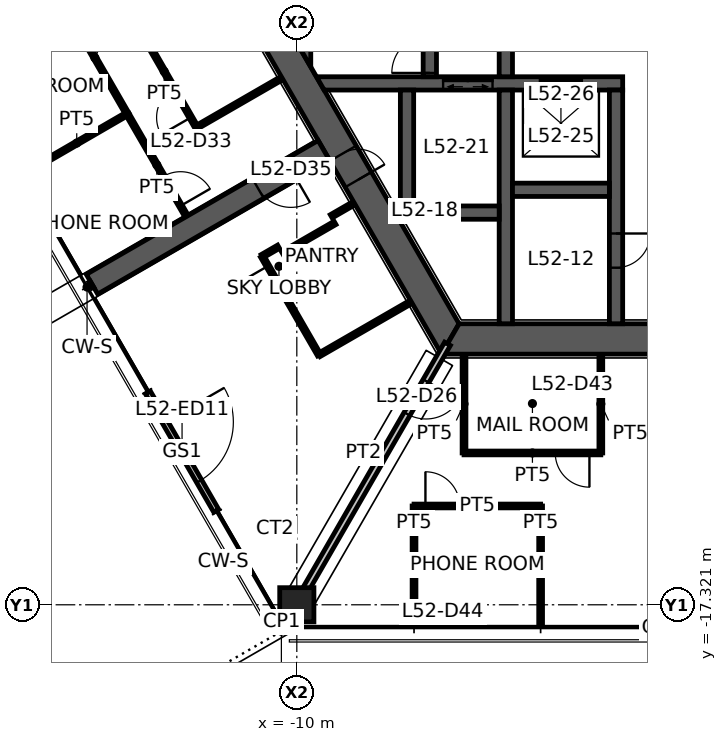
"""IFC4 building model, lengths in metres.
Left out: names, types, materials, properties, quantities, classifications, styles, units other than length and angle.
Written with IfcOpenShell. Run it as: python <this file> out.ifc"""

import sys

from ifc_helpers import new_model, si_unit, direction, frame, frame_2d, origin, origin_2d, place, context, subcontext, project, spatial, polyline, rectangle, hollow_rectangle, outline, extrude, element, fill, save


model = new_model("IFC4")
c1 = context("Model", 3, precision=1e-05, world=origin(), true_north=direction((0.0, 1.0)))
c2 = subcontext(c1, "Body", "Model", "MODEL_VIEW")
j1 = project(units=[si_unit("LENGTHUNIT", "METRE"), si_unit("PLANEANGLEUNIT", "RADIAN")], contexts=[c1])
p1 = place(None, origin())
s1 = spatial("IfcSite", under=j1, at=p1, CompositionType="ELEMENT")
p2 = place(p1, origin())
s2 = spatial("IfcBuilding", under=s1, at=p2, CompositionType="ELEMENT")
p3 = place(p2, frame((0.0, 0.0, 208.3)))
s3 = spatial("IfcBuildingStorey", under=s2, at=p3, CompositionType="ELEMENT", Elevation=208.3)
p4 = place(p3, frame((-10.0, -17.321, 0.0), z_axis=(0.0, 0.0, 1.0), x_axis=(1.0, 0.0, 0.0)))
e1 = element("IfcColumn", 1, at=p4, inside=s3, PredefinedType="COLUMN", context=c2, shape_type="SweptSolid", body=[
    extrude(hollow_rectangle(XDim=0.9, YDim=0.9, WallThickness=0.09, at=origin_2d()), origin(), (0.0, 0.0, 1.0), 4.5),
])
p5 = place(p3, frame((-11.922, 0.0, 0.0), z_axis=(0.0, 0.0, 1.0), x_axis=(0.500004296715, -0.866022923061, 0.0)))
e2 = element("IfcWall", 2, at=p5, inside=s3, PredefinedType="SHEAR", context=c2, shape_type="SweptSolid", body=[
    extrude(outline(polyline([(-0.231, -0.4), (6.281, -0.4), (7.081, -0.4), (12.153, -0.4), (11.691, 0.4), (7.081, 0.4), (6.281, 0.4), (0.231, 0.4), (-0.231, -0.4)])), origin(), (0.0, 0.0, 1.0), 4.5),
])
p6 = place(p5, frame((6.281, 0.0, 0.0)))
e3 = element("IfcOpeningElement", 3, at=p6, cuts=e2, PredefinedType="OPENING", context=c2, shape_type="SweptSolid", body=[
    extrude(rectangle(XDim=0.8, YDim=2.1, at=frame_2d((0.4, 1.05))), frame((0.0, 0.41, 0.0), z_axis=(0.0, -1.0, 0.0), x_axis=(1.0, 0.0, 0.0)), (0.0, 0.0, 1.0), 0.82),
])
p7 = place(p3, frame((-5.961, -10.325, 0.0), z_axis=(0.0, 0.0, 1.0), x_axis=(1.0, 0.0, 0.0)))
e4 = element("IfcWall", 4, at=p7, inside=s3, PredefinedType="SHEAR", context=c2, shape_type="SweptSolid", body=[
    extrude(outline(polyline([(-0.231, -0.4), (5.461, -0.4), (6.461, -0.4), (12.153, -0.4), (11.691, 0.4), (6.461, 0.4), (5.461, 0.4), (0.231, 0.4), (-0.231, -0.4)])), origin(), (0.0, 0.0, 1.0), 4.5),
])
p8 = place(p7, frame((5.461, 0.0, 0.0)))
e5 = element("IfcOpeningElement", 5, at=p8, cuts=e4, PredefinedType="OPENING", context=c2, shape_type="SweptSolid", body=[
    extrude(rectangle(XDim=1.0, YDim=2.1, at=frame_2d((0.5, 1.05))), frame((0.0, 0.41, 0.0), z_axis=(0.0, -1.0, 0.0), x_axis=(1.0, 0.0, 0.0)), (0.0, 0.0, 1.0), 0.82),
])
p9 = place(p3, frame((-9.288, -5.363, 0.0), z_axis=(0.0, 0.0, 1.0), x_axis=(-0.866027473358, -0.499996415376, 0.0)))
e6 = element("IfcWall", 6, at=p9, inside=s3, PredefinedType="SHEAR", context=c2, shape_type="SweptSolid", body=[
    extrude(rectangle(XDim=7.045, YDim=0.6, at=frame_2d((3.523, 0.0))), origin(), (0.0, 0.0, 1.0), 4.5),
])
p10 = place(p9, frame((1.0, 0.0, 0.0)))
e7 = element("IfcOpeningElement", 7, at=p10, cuts=e6, PredefinedType="OPENING", context=c2, shape_type="SweptSolid", body=[
    extrude(rectangle(XDim=1.0, YDim=2.1, at=frame_2d((0.5, 1.05))), frame((0.0, 0.31, 0.0), z_axis=(0.0, -1.0, 0.0), x_axis=(1.0, 0.0, 0.0)), (0.0, 0.0, 1.0), 0.62),
])
p11 = place(p3, frame((-13.92, -11.731, 0.0), z_axis=(0.0, 0.0, 1.0), x_axis=(0.500012057535, -0.866018442252, 0.0)))
e8 = element("IfcWall", 8, at=p11, inside=s3, PredefinedType="STANDARD", context=c2, shape_type="SweptSolid", body=[
    extrude(rectangle(XDim=3.6, YDim=0.15, at=frame_2d((1.8, 0.0))), origin(), (0.0, 0.0, 1.0), 4.5),
])
p12 = place(p11, frame((0.9, 0.0, 0.0)))
e9 = element("IfcOpeningElement", 9, at=p12, cuts=e8, PredefinedType="OPENING", context=c2, shape_type="SweptSolid", body=[
    extrude(rectangle(XDim=1.8, YDim=2.1, at=frame_2d((0.9, 1.05))), frame((0.0, 0.085, 0.0), z_axis=(0.0, -1.0, 0.0), x_axis=(1.0, 0.0, 0.0)), (0.0, 0.0, 1.0), 0.17),
])
p13 = place(p3, frame((-9.382, -3.6, 0.0), z_axis=(0.0, 0.0, 1.0), x_axis=(1.0, 0.0, 0.0)))
e10 = element("IfcWall", 10, at=p13, inside=s3, PredefinedType="SHEAR", context=c2, shape_type="SweptSolid", body=[
    extrude(outline(polyline([(0.101, -0.175), (3.232, -0.175), (4.532, -0.175), (5.782, -0.175), (6.882, -0.175), (7.957, -0.175), (7.957, 0.175), (6.882, 0.175), (5.782, 0.175), (4.532, 0.175), (3.232, 0.175), (-0.101, 0.175), (0.101, -0.175)])), origin(), (0.0, 0.0, 1.0), 4.5),
])
p14 = place(p13, frame((5.782, 0.0, 0.0)))
e11 = element("IfcOpeningElement", 11, at=p14, cuts=e10, PredefinedType="OPENING", context=c2, shape_type="SweptSolid", body=[
    extrude(rectangle(XDim=1.1, YDim=2.1, at=frame_2d((0.55, 1.05))), frame((0.0, 0.185, 0.0), z_axis=(0.0, -1.0, 0.0), x_axis=(1.0, 0.0, 0.0)), (0.0, 0.0, 1.0), 0.37),
])
p15 = place(p13, frame((3.232, 0.0, 0.0)))
e12 = element("IfcOpeningElement", 12, at=p15, cuts=e10, PredefinedType="OPENING", context=c2, shape_type="SweptSolid", body=[
    extrude(rectangle(XDim=1.3, YDim=2.1, at=frame_2d((0.65, 1.05))), frame((0.0, 0.185, 0.0), z_axis=(0.0, -1.0, 0.0), x_axis=(1.0, 0.0, 0.0)), (0.0, 0.0, 1.0), 0.37),
])
p16 = place(p3, frame((-1.6, -3.775, 0.0), z_axis=(0.0, 0.0, 1.0), x_axis=(0.0, -1.0, 0.0)))
e13 = element("IfcWall", 13, at=p16, inside=s3, PredefinedType="SHEAR", context=c2, shape_type="SweptSolid", body=[
    extrude(rectangle(XDim=6.15, YDim=0.35, at=frame_2d((3.075, 0.0))), origin(), (0.0, 0.0, 1.0), 4.5),
])
p17 = place(p16, frame((3.775, 0.0, 0.0)))
e14 = element("IfcOpeningElement", 14, at=p17, cuts=e13, PredefinedType="OPENING", context=c2, shape_type="SweptSolid", body=[
    extrude(rectangle(XDim=0.9, YDim=2.1, at=frame_2d((0.45, 1.05))), frame((0.0, 0.185, 0.0), z_axis=(0.0, -1.0, 0.0), x_axis=(1.0, 0.0, 0.0)), (0.0, 0.0, 1.0), 0.37),
])
p18 = place(p3, frame((-4.5, -3.425, 0.0), z_axis=(0.0, 0.0, 1.0), x_axis=(0.0, 1.0, 0.0)))
e15 = element("IfcWall", 15, at=p18, inside=s3, PredefinedType="SHEAR", context=c2, shape_type="SweptSolid", body=[
    extrude(rectangle(XDim=6.85, YDim=0.35, at=frame_2d((3.425, 0.0))), origin(), (0.0, 0.0, 1.0), 4.5),
])
p19 = place(p18, frame((2.925, 0.0, 0.0)))
e16 = element("IfcOpeningElement", 16, at=p19, cuts=e15, PredefinedType="OPENING", context=c2, shape_type="SweptSolid", body=[
    extrude(rectangle(XDim=1.0, YDim=2.1, at=frame_2d((0.5, 1.05))), frame((0.0, 0.185, 0.0), z_axis=(0.0, -1.0, 0.0), x_axis=(1.0, 0.0, 0.0)), (0.0, 0.0, 1.0), 0.37),
])
p20 = place(p3, frame((-6.5, -3.425, 0.0), z_axis=(0.0, 0.0, 1.0), x_axis=(0.0, 1.0, 0.0)))
e17 = element("IfcWall", 17, at=p20, inside=s3, PredefinedType="SHEAR", context=c2, shape_type="SweptSolid", body=[
    extrude(rectangle(XDim=6.85, YDim=0.35, at=frame_2d((3.425, 0.0))), origin(), (0.0, 0.0, 1.0), 4.5),
])
p21 = place(p20, frame((0.1, 0.0, 0.0)))
e18 = element("IfcOpeningElement", 18, at=p21, cuts=e17, PredefinedType="OPENING", context=c2, shape_type="SweptSolid", body=[
    extrude(rectangle(XDim=1.0, YDim=2.1, at=frame_2d((0.5, 1.05))), frame((0.0, 0.185, 0.0), z_axis=(0.0, -1.0, 0.0), x_axis=(1.0, 0.0, 0.0)), (0.0, 0.0, 1.0), 0.37),
])
p22 = place(p3, frame((-4.5, -3.775, 0.0), z_axis=(0.0, 0.0, 1.0), x_axis=(0.0, -1.0, 0.0)))
e19 = element("IfcWall", 19, at=p22, inside=s3, PredefinedType="SHEAR", context=c2, shape_type="SweptSolid", body=[
    extrude(rectangle(XDim=6.15, YDim=0.35, at=frame_2d((3.075, 0.0))), origin(), (0.0, 0.0, 1.0), 4.5),
])
p23 = place(p3, frame((-4.325, -6.4, 0.0), z_axis=(0.0, 0.0, 1.0), x_axis=(1.0, 0.0, 0.0)))
e20 = element("IfcWall", 20, at=p23, inside=s3, PredefinedType="SHEAR", context=c2, shape_type="SweptSolid", body=[
    extrude(rectangle(XDim=2.55, YDim=0.35, at=frame_2d((1.275, 0.0))), origin(), (0.0, 0.0, 1.0), 4.5),
])
p24 = place(p3, frame((-7.275, -7.0, 0.0), z_axis=(0.0, 0.0, 1.0), x_axis=(1.0, 0.0, 0.0)))
e21 = element("IfcWall", 21, at=p24, inside=s3, PredefinedType="SHEAR", context=c2, shape_type="SweptSolid", body=[
    extrude(rectangle(XDim=2.6, YDim=0.35, at=frame_2d((1.3, 0.0))), origin(), (0.0, 0.0, 1.0), 4.5),
])
p25 = place(p3, frame((-7.1, -3.775, 0.0), z_axis=(0.0, 0.0, 1.0), x_axis=(0.0, -1.0, 0.0)))
e22 = element("IfcWall", 22, at=p25, inside=s3, PredefinedType="SHEAR", context=c2, shape_type="SweptSolid", body=[
    extrude(rectangle(XDim=3.05, YDim=0.35, at=frame_2d((1.525, 0.0))), origin(), (0.0, 0.0, 1.0), 4.5),
])
p26 = place(p3, frame((-9.808, -2.862, 0.0), z_axis=(0.0, 0.0, 1.0), x_axis=(0.0, 1.0, 0.0)))
e23 = element("IfcWall", 23, at=p26, inside=s3, PredefinedType="SHEAR", context=c2, shape_type="SweptSolid", body=[
    extrude(outline(polyline([(-0.303, -0.175), (6.028, -0.175), (5.421, 0.175), (0.303, 0.175), (-0.303, -0.175)])), origin(), (0.0, 0.0, 1.0), 4.5),
])
p27 = place(p3, frame((-6.035, -10.453, 0.0), z_axis=(0.0, 0.0, 1.0), x_axis=(-0.499989830942, -0.866031274813, 0.0)))
e24 = element("IfcWall", 24, at=p27, inside=s3, PredefinedType="PARTITIONING", context=c2, shape_type="SweptSolid", body=[
    extrude(rectangle(XDim=7.93, YDim=0.175, at=frame_2d((3.965, 0.0))), origin(), (0.0, 0.0, 1.0), 3.65),
])
p28 = place(p27, frame((1.13, 0.0, 0.0)))
e25 = element("IfcOpeningElement", 25, at=p28, cuts=e24, PredefinedType="OPENING", context=c2, shape_type="SweptSolid", body=[
    extrude(rectangle(XDim=1.0, YDim=2.1, at=frame_2d((0.5, 1.05))), frame((0.0, 0.098, 0.0), z_axis=(0.0, -1.0, 0.0), x_axis=(1.0, 0.0, 0.0)), (0.0, 0.0, 1.0), 0.195),
])
p29 = place(p3, frame((-12.64, -4.757, 0.0), z_axis=(0.0, 0.0, 1.0), x_axis=(-0.500008388397, 0.866020560687, 0.0)))
e26 = element("IfcWall", 26, at=p29, inside=s3, PredefinedType="PARTITIONING", context=c2, shape_type="SweptSolid", body=[
    extrude(rectangle(XDim=3.4, YDim=0.1, at=frame_2d((1.7, 0.0))), origin(), (0.0, 0.0, 1.0), 3.55),
])
p30 = place(p29, frame((0.3, 0.0, 0.0)))
e27 = element("IfcOpeningElement", 27, at=p30, cuts=e26, PredefinedType="OPENING", context=c2, shape_type="SweptSolid", body=[
    extrude(rectangle(XDim=0.9, YDim=2.1, at=frame_2d((0.45, 1.05))), frame((0.0, 0.06, 0.0), z_axis=(0.0, -1.0, 0.0), x_axis=(1.0, 0.0, 0.0)), (0.0, 0.0, 1.0), 0.12),
])
p31 = place(p3, frame((-10.406, -3.467, 0.0), z_axis=(0.0, 0.0, 1.0), x_axis=(-0.866062676131, -0.499935436844, 0.0)))
e28 = element("IfcWall", 28, at=p31, inside=s3, PredefinedType="PARTITIONING", context=c2, shape_type="SweptSolid", body=[
    extrude(rectangle(XDim=2.58, YDim=0.1, at=frame_2d((1.29, 0.0))), origin(), (0.0, 0.0, 1.0), 3.55),
])
p32 = place(p3, frame((-14.458, -4.398, 0.0), z_axis=(0.0, 0.0, 1.0), x_axis=(-0.865192832628, -0.501439290811, 0.0)))
e29 = element("IfcWall", 29, at=p32, inside=s3, PredefinedType="PARTITIONING", context=c2, shape_type="SweptSolid", body=[
    extrude(rectangle(XDim=3.08, YDim=0.1, at=frame_2d((1.54, 0.0))), origin(), (0.0, 0.0, 1.0), 3.55),
])
p33 = place(p3, frame((-18.823, -2.979, 0.0), z_axis=(0.0, 0.0, 1.0), x_axis=(0.866820377992, 0.498620529359, 0.0)))
e30 = element("IfcWall", 30, at=p33, inside=s3, PredefinedType="PARTITIONING", context=c2, shape_type="SweptSolid", body=[
    extrude(rectangle(XDim=3.07, YDim=0.1, at=frame_2d((1.535, 0.0))), origin(), (0.0, 0.0, 1.0), 3.55),
])
p34 = place(p3, frame((-16.167, -1.447, 0.0), z_axis=(0.0, 0.0, 1.0), x_axis=(0.499990572262, -0.866030846823, 0.0)))
e31 = element("IfcWall", 31, at=p34, inside=s3, PredefinedType="PARTITIONING", context=c2, shape_type="SweptSolid", body=[
    extrude(rectangle(XDim=3.416, YDim=0.1, at=frame_2d((1.708, 0.0))), origin(), (0.0, 0.0, 1.0), 3.55),
])
p35 = place(p34, frame((0.3, 0.0, 0.0)))
e32 = element("IfcOpeningElement", 32, at=p35, cuts=e31, PredefinedType="OPENING", context=c2, shape_type="SweptSolid", body=[
    extrude(rectangle(XDim=0.9, YDim=2.1, at=frame_2d((0.45, 1.05))), frame((0.0, 0.06, 0.0), z_axis=(0.0, -1.0, 0.0), x_axis=(1.0, 0.0, 0.0)), (0.0, 0.0, 1.0), 0.12),
])
p36 = place(p3, frame((-14.46, -4.405, 0.0), z_axis=(0.0, 0.0, 1.0), x_axis=(0.501235238742, -0.865311062823, 0.0)))
e33 = element("IfcWall", 33, at=p36, inside=s3, PredefinedType="PARTITIONING", context=c2, shape_type="SweptSolid", body=[
    extrude(rectangle(XDim=3.095, YDim=0.1, at=frame_2d((1.548, 0.0))), origin(), (0.0, 0.0, 1.0), 3.55),
])
p37 = place(p36, frame((1.896, 0.0, 0.0)))
e34 = element("IfcOpeningElement", 34, at=p37, cuts=e33, PredefinedType="OPENING", context=c2, shape_type="SweptSolid", body=[
    extrude(rectangle(XDim=0.9, YDim=2.1, at=frame_2d((0.45, 1.05))), frame((0.0, 0.06, 0.0), z_axis=(0.0, -1.0, 0.0), x_axis=(1.0, 0.0, 0.0)), (0.0, 0.0, 1.0), 0.12),
])
p38 = place(p3, frame((-10.913, -8.148, 0.0), z_axis=(0.0, 0.0, 1.0), x_axis=(0.866071776036, 0.499919672301, 0.0)))
e35 = element("IfcWall", 35, at=p38, inside=s3, PredefinedType="PARTITIONING", context=c2, shape_type="SweptSolid", body=[
    extrude(rectangle(XDim=0.5, YDim=0.1, at=frame_2d((0.25, 0.0))), origin(), (0.0, 0.0, 1.0), 3.55),
])
p39 = place(p3, frame((-10.38, -8.071, 0.0), z_axis=(0.0, 0.0, 1.0), x_axis=(0.865989903783, 0.500061482766, 0.0)))
e36 = element("IfcWall", 36, at=p39, inside=s3, PredefinedType="PARTITIONING", context=c2, shape_type="SweptSolid", body=[
    extrude(rectangle(XDim=1.6, YDim=0.1, at=frame_2d((0.8, 0.0))), origin(), (0.0, 0.0, 1.0), 3.55),
])
p40 = place(p3, frame((-9.413, -10.746, 0.0), z_axis=(0.0, 0.0, 1.0), x_axis=(-0.50002537861, 0.866010750942, 0.0)))
e37 = element("IfcWall", 37, at=p40, inside=s3, PredefinedType="PARTITIONING", context=c2, shape_type="SweptSolid", body=[
    extrude(rectangle(XDim=3.0, YDim=0.1, at=frame_2d((1.5, 0.0))), origin(), (0.0, 0.0, 1.0), 3.55),
])
p41 = place(p40, frame((1.8, 0.0, 0.0)))
e38 = element("IfcOpeningElement", 38, at=p41, cuts=e37, PredefinedType="OPENING", context=c2, shape_type="SweptSolid", body=[
    extrude(rectangle(XDim=0.9, YDim=2.1, at=frame_2d((0.45, 1.05))), frame((0.0, 0.06, 0.0), z_axis=(0.0, -1.0, 0.0), x_axis=(1.0, 0.0, 0.0)), (0.0, 0.0, 1.0), 0.12),
])
p42 = place(p3, frame((-9.094, -7.098, 0.0), z_axis=(0.0, 0.0, 1.0), x_axis=(0.865958369053, 0.50011608959, 0.0)))
e39 = element("IfcWall", 39, at=p42, inside=s3, PredefinedType="PARTITIONING", context=c2, shape_type="SweptSolid", body=[
    extrude(rectangle(XDim=0.68, YDim=0.1, at=frame_2d((0.34, 0.0))), origin(), (0.0, 0.0, 1.0), 3.55),
])
p43 = place(p3, frame((-7.005, -9.356, 0.0), z_axis=(0.0, 0.0, 1.0), x_axis=(-0.866056901187, -0.49994544093, 0.0)))
e40 = element("IfcWall", 40, at=p43, inside=s3, PredefinedType="PARTITIONING", context=c2, shape_type="SweptSolid", body=[
    extrude(rectangle(XDim=2.78, YDim=0.1, at=frame_2d((1.39, 0.0))), origin(), (0.0, 0.0, 1.0), 3.55),
])
p44 = place(p3, frame((-5.6, -13.325, 0.0), z_axis=(0.0, 0.0, 1.0), x_axis=(0.0, 1.0, 0.0)))
e41 = element("IfcWall", 41, at=p44, inside=s3, PredefinedType="PARTITIONING", context=c2, shape_type="SweptSolid", body=[
    extrude(rectangle(XDim=2.58, YDim=0.1, at=frame_2d((1.29, 0.0))), origin(), (0.0, 0.0, 1.0), 3.55),
])
p45 = place(p3, frame((-2.0, -13.325, 0.0), z_axis=(0.0, 0.0, 1.0), x_axis=(-1.0, 0.0, 0.0)))
e42 = element("IfcWall", 42, at=p45, inside=s3, PredefinedType="PARTITIONING", context=c2, shape_type="SweptSolid", body=[
    extrude(rectangle(XDim=3.6, YDim=0.1, at=frame_2d((1.8, 0.0))), origin(), (0.0, 0.0, 1.0), 3.55),
])
p46 = place(p45, frame((0.3, 0.0, 0.0)))
e43 = element("IfcOpeningElement", 43, at=p46, cuts=e42, PredefinedType="OPENING", context=c2, shape_type="SweptSolid", body=[
    extrude(rectangle(XDim=0.9, YDim=2.1, at=frame_2d((0.45, 1.05))), frame((0.0, 0.06, 0.0), z_axis=(0.0, -1.0, 0.0), x_axis=(1.0, 0.0, 0.0)), (0.0, 0.0, 1.0), 0.12),
])
p47 = place(p3, frame((-2.0, -10.745, 0.0), z_axis=(0.0, 0.0, 1.0), x_axis=(0.0, -1.0, 0.0)))
e44 = element("IfcWall", 44, at=p47, inside=s3, PredefinedType="PARTITIONING", context=c2, shape_type="SweptSolid", body=[
    extrude(rectangle(XDim=2.58, YDim=0.1, at=frame_2d((1.29, 0.0))), origin(), (0.0, 0.0, 1.0), 3.55),
])
p48 = place(p3, frame((-6.916, -17.801, 0.0), z_axis=(0.0, 0.0, 1.0), x_axis=(0.0, 1.0, 0.0)))
e45 = element("IfcWall", 45, at=p48, inside=s3, PredefinedType="PARTITIONING", context=c2, shape_type="SweptSolid", body=[
    extrude(rectangle(XDim=3.08, YDim=0.1, at=frame_2d((1.54, 0.0))), origin(), (0.0, 0.0, 1.0), 3.55),
])
p49 = place(p3, frame((-6.916, -14.72, 0.0), z_axis=(0.0, 0.0, 1.0), x_axis=(1.0, 0.0, 0.0)))
e46 = element("IfcWall", 46, at=p49, inside=s3, PredefinedType="PARTITIONING", context=c2, shape_type="SweptSolid", body=[
    extrude(rectangle(XDim=3.331, YDim=0.1, at=frame_2d((1.666, 0.0))), origin(), (0.0, 0.0, 1.0), 3.55),
])
p50 = place(p49, frame((0.3, 0.0, 0.0)))
e47 = element("IfcOpeningElement", 47, at=p50, cuts=e46, PredefinedType="OPENING", context=c2, shape_type="SweptSolid", body=[
    extrude(rectangle(XDim=0.9, YDim=2.1, at=frame_2d((0.45, 1.05))), frame((0.0, 0.06, 0.0), z_axis=(0.0, -1.0, 0.0), x_axis=(1.0, 0.0, 0.0)), (0.0, 0.0, 1.0), 0.12),
])
p51 = place(p3, frame((-3.584, -14.72, 0.0), z_axis=(0.0, 0.0, 1.0), x_axis=(0.0, -1.0, 0.0)))
e48 = element("IfcWall", 48, at=p51, inside=s3, PredefinedType="PARTITIONING", context=c2, shape_type="SweptSolid", body=[
    extrude(rectangle(XDim=3.08, YDim=0.1, at=frame_2d((1.54, 0.0))), origin(), (0.0, 0.0, 1.0), 3.55),
])
p52 = place(p3, frame((-15.39, -8.885, 0.0), z_axis=(0.0, 0.0, 1.0), x_axis=(-0.866906303058, -0.498471124258, 0.0)))
e49 = element("IfcWall", 49, at=p52, inside=s3, PredefinedType="PARTITIONING", context=c2, shape_type="SweptSolid", body=[
    extrude(rectangle(XDim=0.045, YDim=0.175, at=frame_2d((0.022, 0.0))), origin(), (0.0, 0.0, 1.0), 4.5),
])
p53 = place(p12, origin())
e50 = element("IfcDoor", 50, at=p53, inside=s3, OperationType="DOUBLE_DOOR_SINGLE_SWING", PredefinedType="DOOR", context=c2, shape_type="SweptSolid", body=[
    extrude(rectangle(XDim=1.8, YDim=2.1, at=frame_2d((0.9, 1.05))), frame((0.0, 0.025, 0.0), z_axis=(0.0, -1.0, 0.0), x_axis=(1.0, 0.0, 0.0)), (0.0, 0.0, 1.0), 0.05),
])
fill(e9, e50)
p54 = place(p6, origin())
e51 = element("IfcDoor", 51, at=p54, inside=s3, OperationType="SINGLE_SWING_RIGHT", PredefinedType="DOOR", context=c2, shape_type="SweptSolid", body=[
    extrude(rectangle(XDim=0.8, YDim=2.1, at=frame_2d((0.4, 1.05))), frame((0.0, 0.025, 0.0), z_axis=(0.0, -1.0, 0.0), x_axis=(1.0, 0.0, 0.0)), (0.0, 0.0, 1.0), 0.05),
])
fill(e3, e51)
p55 = place(p21, origin())
e52 = element("IfcDoor", 52, at=p55, inside=s3, OperationType="SINGLE_SWING_LEFT", PredefinedType="DOOR", context=c2, shape_type="SweptSolid", body=[
    extrude(rectangle(XDim=1.0, YDim=2.1, at=frame_2d((0.5, 1.05))), frame((0.0, 0.025, 0.0), z_axis=(0.0, -1.0, 0.0), x_axis=(1.0, 0.0, 0.0)), (0.0, 0.0, 1.0), 0.05),
])
fill(e18, e52)
p56 = place(p17, origin())
e53 = element("IfcDoor", 53, at=p56, inside=s3, OperationType="SINGLE_SWING_LEFT", PredefinedType="DOOR", context=c2, shape_type="SweptSolid", body=[
    extrude(rectangle(XDim=0.9, YDim=2.1, at=frame_2d((0.45, 1.05))), frame((0.0, 0.025, 0.0), z_axis=(0.0, -1.0, 0.0), x_axis=(1.0, 0.0, 0.0)), (0.0, 0.0, 1.0), 0.05),
])
fill(e14, e53)
p57 = place(p10, origin())
e54 = element("IfcDoor", 54, at=p57, inside=s3, OperationType="SINGLE_SWING_LEFT", PredefinedType="DOOR", context=c2, shape_type="SweptSolid", body=[
    extrude(rectangle(XDim=1.0, YDim=2.1, at=frame_2d((0.5, 1.05))), frame((0.0, 0.025, 0.0), z_axis=(0.0, -1.0, 0.0), x_axis=(1.0, 0.0, 0.0)), (0.0, 0.0, 1.0), 0.05),
])
fill(e7, e54)
p58 = place(p28, origin())
e55 = element("IfcDoor", 55, at=p58, inside=s3, OperationType="SINGLE_SWING_LEFT", PredefinedType="DOOR", context=c2, shape_type="SweptSolid", body=[
    extrude(rectangle(XDim=1.0, YDim=2.1, at=frame_2d((0.5, 1.05))), frame((0.0, 0.025, 0.0), z_axis=(0.0, -1.0, 0.0), x_axis=(1.0, 0.0, 0.0)), (0.0, 0.0, 1.0), 0.05),
])
fill(e25, e55)
p59 = place(p30, origin())
e56 = element("IfcDoor", 56, at=p59, inside=s3, OperationType="SINGLE_SWING_LEFT", PredefinedType="DOOR", context=c2, shape_type="SweptSolid", body=[
    extrude(rectangle(XDim=0.9, YDim=2.1, at=frame_2d((0.45, 1.05))), frame((0.0, 0.025, 0.0), z_axis=(0.0, -1.0, 0.0), x_axis=(1.0, 0.0, 0.0)), (0.0, 0.0, 1.0), 0.05),
])
fill(e27, e56)
p60 = place(p37, origin())
e57 = element("IfcDoor", 57, at=p60, inside=s3, OperationType="SINGLE_SWING_RIGHT", PredefinedType="DOOR", context=c2, shape_type="SweptSolid", body=[
    extrude(rectangle(XDim=0.9, YDim=2.1, at=frame_2d((0.45, 1.05))), frame((0.0, 0.025, 0.0), z_axis=(0.0, -1.0, 0.0), x_axis=(1.0, 0.0, 0.0)), (0.0, 0.0, 1.0), 0.05),
])
fill(e34, e57)
p61 = place(p41, origin())
e58 = element("IfcDoor", 58, at=p61, inside=s3, OperationType="SINGLE_SWING_RIGHT", PredefinedType="DOOR", context=c2, shape_type="SweptSolid", body=[
    extrude(rectangle(XDim=0.9, YDim=2.1, at=frame_2d((0.45, 1.05))), frame((0.0, 0.025, 0.0), z_axis=(0.0, -1.0, 0.0), x_axis=(1.0, 0.0, 0.0)), (0.0, 0.0, 1.0), 0.05),
])
fill(e38, e58)
p62 = place(p46, origin())
e59 = element("IfcDoor", 59, at=p62, inside=s3, OperationType="SINGLE_SWING_LEFT", PredefinedType="DOOR", context=c2, shape_type="SweptSolid", body=[
    extrude(rectangle(XDim=0.9, YDim=2.1, at=frame_2d((0.45, 1.05))), frame((0.0, 0.025, 0.0), z_axis=(0.0, -1.0, 0.0), x_axis=(1.0, 0.0, 0.0)), (0.0, 0.0, 1.0), 0.05),
])
fill(e43, e59)
p63 = place(p50, origin())
e60 = element("IfcDoor", 60, at=p63, inside=s3, OperationType="SINGLE_SWING_LEFT", PredefinedType="DOOR", context=c2, shape_type="SweptSolid", body=[
    extrude(rectangle(XDim=0.9, YDim=2.1, at=frame_2d((0.45, 1.05))), frame((0.0, 0.025, 0.0), z_axis=(0.0, -1.0, 0.0), x_axis=(1.0, 0.0, 0.0)), (0.0, 0.0, 1.0), 0.05),
])
fill(e47, e60)
p64 = place(p14, origin())
e61 = element("IfcDoor", 61, at=p64, inside=s3, OperationType="DOUBLE_DOOR_SLIDING", PredefinedType="DOOR", context=c2, shape_type="SweptSolid", body=[
    extrude(rectangle(XDim=1.1, YDim=2.1, at=frame_2d((0.55, 1.05))), frame((0.0, 0.025, 0.0), z_axis=(0.0, -1.0, 0.0), x_axis=(1.0, 0.0, 0.0)), (0.0, 0.0, 1.0), 0.05),
])
fill(e11, e61)
p65 = place(p15, origin())
e62 = element("IfcDoor", 62, at=p65, inside=s3, OperationType="DOUBLE_DOOR_SLIDING", PredefinedType="DOOR", context=c2, shape_type="SweptSolid", body=[
    extrude(rectangle(XDim=1.3, YDim=2.1, at=frame_2d((0.65, 1.05))), frame((0.0, 0.025, 0.0), z_axis=(0.0, -1.0, 0.0), x_axis=(1.0, 0.0, 0.0)), (0.0, 0.0, 1.0), 0.05),
])
fill(e12, e62)
save(model, sys.argv[1])
